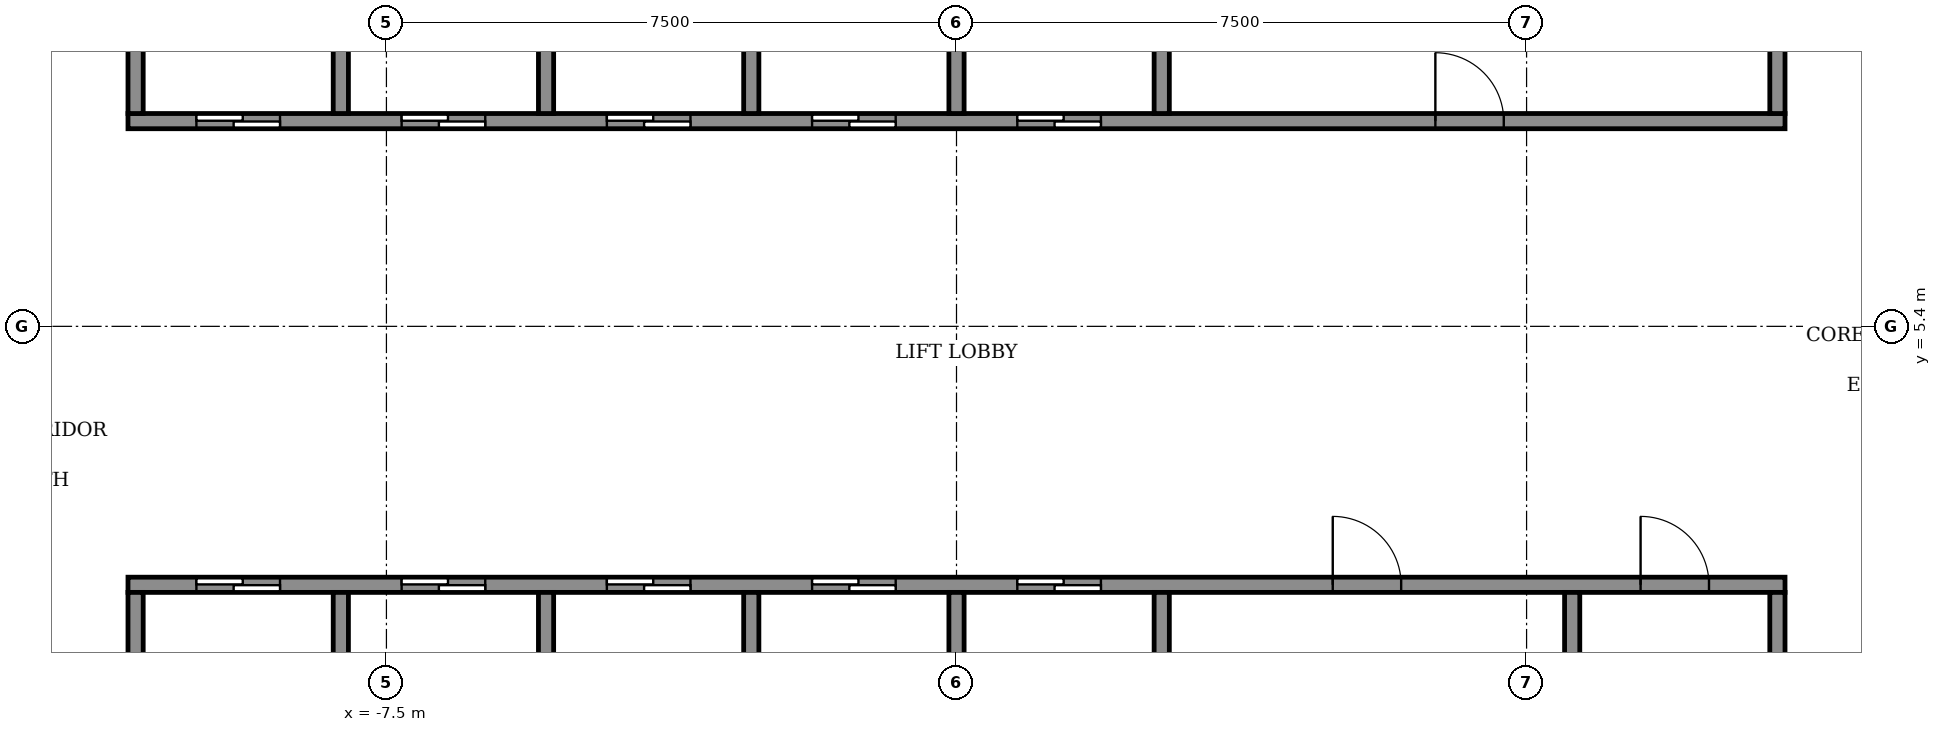
"""IFC4 building model, lengths in metres.
Left out: names, types, materials, properties, quantities, classifications, styles, units other than length and angle.
Written with IfcOpenShell. Run it as: python <this file> out.ifc"""

import sys

from ifc_helpers import new_model, si_unit, direction, frame, frame_2d, origin, place, context, subcontext, project, spatial, rectangle, extrude, element, fill, save


model = new_model("IFC4")
c1 = context("Model", 3, precision=1e-05, world=origin(), true_north=direction((0.0, 1.0)))
c2 = subcontext(c1, "Body", "Model", "MODEL_VIEW")
j1 = project(units=[si_unit("LENGTHUNIT", "METRE"), si_unit("PLANEANGLEUNIT", "RADIAN")], contexts=[c1])
p1 = place(None, origin())
s1 = spatial("IfcSite", under=j1, at=p1, CompositionType="ELEMENT")
p2 = place(p1, origin())
s2 = spatial("IfcBuilding", under=s1, at=p2, CompositionType="ELEMENT")
p3 = place(p2, frame((0.0, 0.0, 97.3)))
s3 = spatial("IfcBuildingStorey", under=s2, at=p3, CompositionType="ELEMENT", Elevation=97.3)
p4 = place(p3, frame((-10.9, 2.0, 0.0), z_axis=(0.0, 0.0, 1.0), x_axis=(1.0, 0.0, 0.0)))
e1 = element("IfcWall", 1, at=p4, inside=s3, PredefinedType="SHEAR", context=c2, shape_type="SweptSolid", body=[
    extrude(rectangle(XDim=21.8, YDim=0.2, at=frame_2d((10.9, 0.0))), origin(), (0.0, 0.0, 1.0), 4.05),
])
p5 = place(p4, frame((0.9, 0.0, 0.0)))
e2 = element("IfcOpeningElement", 2, at=p5, cuts=e1, PredefinedType="OPENING", context=c2, shape_type="SweptSolid", body=[
    extrude(rectangle(XDim=1.1, YDim=2.1, at=frame_2d((0.55, 1.05))), frame((0.0, 0.11, 0.0), z_axis=(0.0, -1.0, 0.0), x_axis=(1.0, 0.0, 0.0)), (0.0, 0.0, 1.0), 0.22),
])
p6 = place(p4, frame((3.6, 0.0, 0.0)))
e3 = element("IfcOpeningElement", 3, at=p6, cuts=e1, PredefinedType="OPENING", context=c2, shape_type="SweptSolid", body=[
    extrude(rectangle(XDim=1.1, YDim=2.1, at=frame_2d((0.55, 1.05))), frame((0.0, 0.11, 0.0), z_axis=(0.0, -1.0, 0.0), x_axis=(1.0, 0.0, 0.0)), (0.0, 0.0, 1.0), 0.22),
])
p7 = place(p4, frame((6.3, 0.0, 0.0)))
e4 = element("IfcOpeningElement", 4, at=p7, cuts=e1, PredefinedType="OPENING", context=c2, shape_type="SweptSolid", body=[
    extrude(rectangle(XDim=1.1, YDim=2.1, at=frame_2d((0.55, 1.05))), frame((0.0, 0.11, 0.0), z_axis=(0.0, -1.0, 0.0), x_axis=(1.0, 0.0, 0.0)), (0.0, 0.0, 1.0), 0.22),
])
p8 = place(p4, frame((9.0, 0.0, 0.0)))
e5 = element("IfcOpeningElement", 5, at=p8, cuts=e1, PredefinedType="OPENING", context=c2, shape_type="SweptSolid", body=[
    extrude(rectangle(XDim=1.1, YDim=2.1, at=frame_2d((0.55, 1.05))), frame((0.0, 0.11, 0.0), z_axis=(0.0, -1.0, 0.0), x_axis=(1.0, 0.0, 0.0)), (0.0, 0.0, 1.0), 0.22),
])
p9 = place(p4, frame((11.7, 0.0, 0.0)))
e6 = element("IfcOpeningElement", 6, at=p9, cuts=e1, PredefinedType="OPENING", context=c2, shape_type="SweptSolid", body=[
    extrude(rectangle(XDim=1.1, YDim=2.1, at=frame_2d((0.55, 1.05))), frame((0.0, 0.11, 0.0), z_axis=(0.0, -1.0, 0.0), x_axis=(1.0, 0.0, 0.0)), (0.0, 0.0, 1.0), 0.22),
])
p10 = place(p4, frame((15.85, 0.0, 0.0)))
e7 = element("IfcOpeningElement", 7, at=p10, cuts=e1, PredefinedType="OPENING", context=c2, shape_type="SweptSolid", body=[
    extrude(rectangle(XDim=0.9, YDim=2.1, at=frame_2d((0.45, 1.05))), frame((0.0, 0.11, 0.0), z_axis=(0.0, -1.0, 0.0), x_axis=(1.0, 0.0, 0.0)), (0.0, 0.0, 1.0), 0.22),
])
p11 = place(p4, frame((19.9, 0.0, 0.0)))
e8 = element("IfcOpeningElement", 8, at=p11, cuts=e1, PredefinedType="OPENING", context=c2, shape_type="SweptSolid", body=[
    extrude(rectangle(XDim=0.9, YDim=2.1, at=frame_2d((0.45, 1.05))), frame((0.0, 0.11, 0.0), z_axis=(0.0, -1.0, 0.0), x_axis=(1.0, 0.0, 0.0)), (0.0, 0.0, 1.0), 0.22),
])
p12 = place(p3, frame((-10.9, 8.1, 0.0), z_axis=(0.0, 0.0, 1.0), x_axis=(1.0, 0.0, 0.0)))
e9 = element("IfcWall", 9, at=p12, inside=s3, PredefinedType="SHEAR", context=c2, shape_type="SweptSolid", body=[
    extrude(rectangle(XDim=21.8, YDim=0.2, at=frame_2d((10.9, 0.0))), origin(), (0.0, 0.0, 1.0), 4.05),
])
p13 = place(p12, frame((0.9, 0.0, 0.0)))
e10 = element("IfcOpeningElement", 10, at=p13, cuts=e9, PredefinedType="OPENING", context=c2, shape_type="SweptSolid", body=[
    extrude(rectangle(XDim=1.1, YDim=2.1, at=frame_2d((0.55, 1.05))), frame((0.0, 0.11, 0.0), z_axis=(0.0, -1.0, 0.0), x_axis=(1.0, 0.0, 0.0)), (0.0, 0.0, 1.0), 0.22),
])
p14 = place(p12, frame((3.6, 0.0, 0.0)))
e11 = element("IfcOpeningElement", 11, at=p14, cuts=e9, PredefinedType="OPENING", context=c2, shape_type="SweptSolid", body=[
    extrude(rectangle(XDim=1.1, YDim=2.1, at=frame_2d((0.55, 1.05))), frame((0.0, 0.11, 0.0), z_axis=(0.0, -1.0, 0.0), x_axis=(1.0, 0.0, 0.0)), (0.0, 0.0, 1.0), 0.22),
])
p15 = place(p12, frame((6.3, 0.0, 0.0)))
e12 = element("IfcOpeningElement", 12, at=p15, cuts=e9, PredefinedType="OPENING", context=c2, shape_type="SweptSolid", body=[
    extrude(rectangle(XDim=1.1, YDim=2.1, at=frame_2d((0.55, 1.05))), frame((0.0, 0.11, 0.0), z_axis=(0.0, -1.0, 0.0), x_axis=(1.0, 0.0, 0.0)), (0.0, 0.0, 1.0), 0.22),
])
p16 = place(p12, frame((9.0, 0.0, 0.0)))
e13 = element("IfcOpeningElement", 13, at=p16, cuts=e9, PredefinedType="OPENING", context=c2, shape_type="SweptSolid", body=[
    extrude(rectangle(XDim=1.1, YDim=2.1, at=frame_2d((0.55, 1.05))), frame((0.0, 0.11, 0.0), z_axis=(0.0, -1.0, 0.0), x_axis=(1.0, 0.0, 0.0)), (0.0, 0.0, 1.0), 0.22),
])
p17 = place(p12, frame((11.7, 0.0, 0.0)))
e14 = element("IfcOpeningElement", 14, at=p17, cuts=e9, PredefinedType="OPENING", context=c2, shape_type="SweptSolid", body=[
    extrude(rectangle(XDim=1.1, YDim=2.1, at=frame_2d((0.55, 1.05))), frame((0.0, 0.11, 0.0), z_axis=(0.0, -1.0, 0.0), x_axis=(1.0, 0.0, 0.0)), (0.0, 0.0, 1.0), 0.22),
])
p18 = place(p12, frame((17.2, 0.0, 0.0)))
e15 = element("IfcOpeningElement", 15, at=p18, cuts=e9, PredefinedType="OPENING", context=c2, shape_type="SweptSolid", body=[
    extrude(rectangle(XDim=0.9, YDim=2.1, at=frame_2d((0.45, 1.05))), frame((0.0, 0.11, 0.0), z_axis=(0.0, -1.0, 0.0), x_axis=(1.0, 0.0, 0.0)), (0.0, 0.0, 1.0), 0.22),
])
for number, where, z_axis, x_axis in (
    (16, (-10.8, -0.6, 0.0), (0.0, 0.0, 1.0), (0.0, 1.0, 0.0)),
    (17, (-8.1, -0.6, 0.0), (0.0, 0.0, 1.0), (0.0, 1.0, 0.0)),
    (18, (-5.4, -0.6, 0.0), (0.0, 0.0, 1.0), (0.0, 1.0, 0.0)),
    (19, (-2.7, -0.6, 0.0), (0.0, 0.0, 1.0), (0.0, 1.0, 0.0)),
    (20, (0.0, -0.6, 0.0), (0.0, 0.0, 1.0), (0.0, 1.0, 0.0)),
    (21, (2.7, -0.6, 0.0), (0.0, 0.0, 1.0), (0.0, 1.0, 0.0)),
):
    element("IfcWall", number, at=place(p3, frame(where, z_axis=z_axis, x_axis=x_axis)), inside=s3, PredefinedType="SHEAR", context=c2, shape_type="SweptSolid", body=[
        extrude(rectangle(XDim=2.5, YDim=0.2, at=frame_2d((1.25, 0.0))), origin(), (0.0, 0.0, 1.0), 4.05),
    ])
for number, where, z_axis, x_axis in (
    (22, (8.1, -0.6, 0.0), (0.0, 0.0, 1.0), (0.0, 1.0, 0.0)),
    (23, (10.8, -0.6, 0.0), (0.0, 0.0, 1.0), (0.0, 1.0, 0.0)),
):
    element("IfcWall", number, at=place(p3, frame(where, z_axis=z_axis, x_axis=x_axis)), inside=s3, PredefinedType="STANDARD", context=c2, shape_type="SweptSolid", body=[
        extrude(rectangle(XDim=2.5, YDim=0.2, at=frame_2d((1.25, 0.0))), origin(), (0.0, 0.0, 1.0), 4.05),
    ])
for number, where, z_axis, x_axis in (
    (24, (-10.8, 8.2, 0.0), (0.0, 0.0, 1.0), (0.0, 1.0, 0.0)),
    (25, (-8.1, 8.2, 0.0), (0.0, 0.0, 1.0), (0.0, 1.0, 0.0)),
    (26, (-5.4, 8.2, 0.0), (0.0, 0.0, 1.0), (0.0, 1.0, 0.0)),
    (27, (-2.7, 8.2, 0.0), (0.0, 0.0, 1.0), (0.0, 1.0, 0.0)),
    (28, (0.0, 8.2, 0.0), (0.0, 0.0, 1.0), (0.0, 1.0, 0.0)),
    (29, (2.7, 8.2, 0.0), (0.0, 0.0, 1.0), (0.0, 1.0, 0.0)),
):
    element("IfcWall", number, at=place(p3, frame(where, z_axis=z_axis, x_axis=x_axis)), inside=s3, PredefinedType="SHEAR", context=c2, shape_type="SweptSolid", body=[
        extrude(rectangle(XDim=2.6, YDim=0.2, at=frame_2d((1.3, 0.0))), origin(), (0.0, 0.0, 1.0), 4.05),
    ])
p19 = place(p3, frame((10.8, 8.2, 0.0), z_axis=(0.0, 0.0, 1.0), x_axis=(0.0, 1.0, 0.0)))
e30 = element("IfcWall", 30, at=p19, inside=s3, PredefinedType="STANDARD", context=c2, shape_type="SweptSolid", body=[
    extrude(rectangle(XDim=2.6, YDim=0.2, at=frame_2d((1.3, 0.0))), origin(), (0.0, 0.0, 1.0), 4.05),
])
p20 = place(p5, origin())
e31 = element("IfcDoor", 31, at=p20, inside=s3, OperationType="SLIDING_TO_LEFT", PredefinedType="DOOR", context=c2, shape_type="SweptSolid", body=[
    extrude(rectangle(XDim=1.1, YDim=2.1, at=frame_2d((0.55, 1.05))), frame((0.0, 0.025, 0.0), z_axis=(0.0, -1.0, 0.0), x_axis=(1.0, 0.0, 0.0)), (0.0, 0.0, 1.0), 0.05),
])
fill(e2, e31)
p21 = place(p6, origin())
e32 = element("IfcDoor", 32, at=p21, inside=s3, OperationType="SLIDING_TO_LEFT", PredefinedType="DOOR", context=c2, shape_type="SweptSolid", body=[
    extrude(rectangle(XDim=1.1, YDim=2.1, at=frame_2d((0.55, 1.05))), frame((0.0, 0.025, 0.0), z_axis=(0.0, -1.0, 0.0), x_axis=(1.0, 0.0, 0.0)), (0.0, 0.0, 1.0), 0.05),
])
fill(e3, e32)
p22 = place(p7, origin())
e33 = element("IfcDoor", 33, at=p22, inside=s3, OperationType="SLIDING_TO_LEFT", PredefinedType="DOOR", context=c2, shape_type="SweptSolid", body=[
    extrude(rectangle(XDim=1.1, YDim=2.1, at=frame_2d((0.55, 1.05))), frame((0.0, 0.025, 0.0), z_axis=(0.0, -1.0, 0.0), x_axis=(1.0, 0.0, 0.0)), (0.0, 0.0, 1.0), 0.05),
])
fill(e4, e33)
p23 = place(p8, origin())
e34 = element("IfcDoor", 34, at=p23, inside=s3, OperationType="SLIDING_TO_LEFT", PredefinedType="DOOR", context=c2, shape_type="SweptSolid", body=[
    extrude(rectangle(XDim=1.1, YDim=2.1, at=frame_2d((0.55, 1.05))), frame((0.0, 0.025, 0.0), z_axis=(0.0, -1.0, 0.0), x_axis=(1.0, 0.0, 0.0)), (0.0, 0.0, 1.0), 0.05),
])
fill(e5, e34)
p24 = place(p9, origin())
e35 = element("IfcDoor", 35, at=p24, inside=s3, OperationType="SLIDING_TO_LEFT", PredefinedType="DOOR", context=c2, shape_type="SweptSolid", body=[
    extrude(rectangle(XDim=1.1, YDim=2.1, at=frame_2d((0.55, 1.05))), frame((0.0, 0.025, 0.0), z_axis=(0.0, -1.0, 0.0), x_axis=(1.0, 0.0, 0.0)), (0.0, 0.0, 1.0), 0.05),
])
fill(e6, e35)
p25 = place(p13, origin())
e36 = element("IfcDoor", 36, at=p25, inside=s3, OperationType="SLIDING_TO_LEFT", PredefinedType="DOOR", context=c2, shape_type="SweptSolid", body=[
    extrude(rectangle(XDim=1.1, YDim=2.1, at=frame_2d((0.55, 1.05))), frame((0.0, 0.025, 0.0), z_axis=(0.0, -1.0, 0.0), x_axis=(1.0, 0.0, 0.0)), (0.0, 0.0, 1.0), 0.05),
])
fill(e10, e36)
p26 = place(p14, origin())
e37 = element("IfcDoor", 37, at=p26, inside=s3, OperationType="SLIDING_TO_LEFT", PredefinedType="DOOR", context=c2, shape_type="SweptSolid", body=[
    extrude(rectangle(XDim=1.1, YDim=2.1, at=frame_2d((0.55, 1.05))), frame((0.0, 0.025, 0.0), z_axis=(0.0, -1.0, 0.0), x_axis=(1.0, 0.0, 0.0)), (0.0, 0.0, 1.0), 0.05),
])
fill(e11, e37)
p27 = place(p15, origin())
e38 = element("IfcDoor", 38, at=p27, inside=s3, OperationType="SLIDING_TO_LEFT", PredefinedType="DOOR", context=c2, shape_type="SweptSolid", body=[
    extrude(rectangle(XDim=1.1, YDim=2.1, at=frame_2d((0.55, 1.05))), frame((0.0, 0.025, 0.0), z_axis=(0.0, -1.0, 0.0), x_axis=(1.0, 0.0, 0.0)), (0.0, 0.0, 1.0), 0.05),
])
fill(e12, e38)
p28 = place(p16, origin())
e39 = element("IfcDoor", 39, at=p28, inside=s3, OperationType="SLIDING_TO_LEFT", PredefinedType="DOOR", context=c2, shape_type="SweptSolid", body=[
    extrude(rectangle(XDim=1.1, YDim=2.1, at=frame_2d((0.55, 1.05))), frame((0.0, 0.025, 0.0), z_axis=(0.0, -1.0, 0.0), x_axis=(1.0, 0.0, 0.0)), (0.0, 0.0, 1.0), 0.05),
])
fill(e13, e39)
p29 = place(p17, origin())
e40 = element("IfcDoor", 40, at=p29, inside=s3, OperationType="SLIDING_TO_LEFT", PredefinedType="DOOR", context=c2, shape_type="SweptSolid", body=[
    extrude(rectangle(XDim=1.1, YDim=2.1, at=frame_2d((0.55, 1.05))), frame((0.0, 0.025, 0.0), z_axis=(0.0, -1.0, 0.0), x_axis=(1.0, 0.0, 0.0)), (0.0, 0.0, 1.0), 0.05),
])
fill(e14, e40)
p30 = place(p10, origin())
e41 = element("IfcDoor", 41, at=p30, inside=s3, OperationType="SINGLE_SWING_RIGHT", PredefinedType="DOOR", context=c2, shape_type="SweptSolid", body=[
    extrude(rectangle(XDim=0.9, YDim=2.1, at=frame_2d((0.45, 1.05))), frame((0.0, 0.025, 0.0), z_axis=(0.0, -1.0, 0.0), x_axis=(1.0, 0.0, 0.0)), (0.0, 0.0, 1.0), 0.05),
])
fill(e7, e41)
p31 = place(p11, origin())
e42 = element("IfcDoor", 42, at=p31, inside=s3, OperationType="SINGLE_SWING_RIGHT", PredefinedType="DOOR", context=c2, shape_type="SweptSolid", body=[
    extrude(rectangle(XDim=0.9, YDim=2.1, at=frame_2d((0.45, 1.05))), frame((0.0, 0.025, 0.0), z_axis=(0.0, -1.0, 0.0), x_axis=(1.0, 0.0, 0.0)), (0.0, 0.0, 1.0), 0.05),
])
fill(e8, e42)
p32 = place(p18, origin())
e43 = element("IfcDoor", 43, at=p32, inside=s3, OperationType="SINGLE_SWING_RIGHT", PredefinedType="DOOR", context=c2, shape_type="SweptSolid", body=[
    extrude(rectangle(XDim=0.9, YDim=2.1, at=frame_2d((0.45, 1.05))), frame((0.0, 0.025, 0.0), z_axis=(0.0, -1.0, 0.0), x_axis=(1.0, 0.0, 0.0)), (0.0, 0.0, 1.0), 0.05),
])
fill(e15, e43)
save(model, sys.argv[1])
